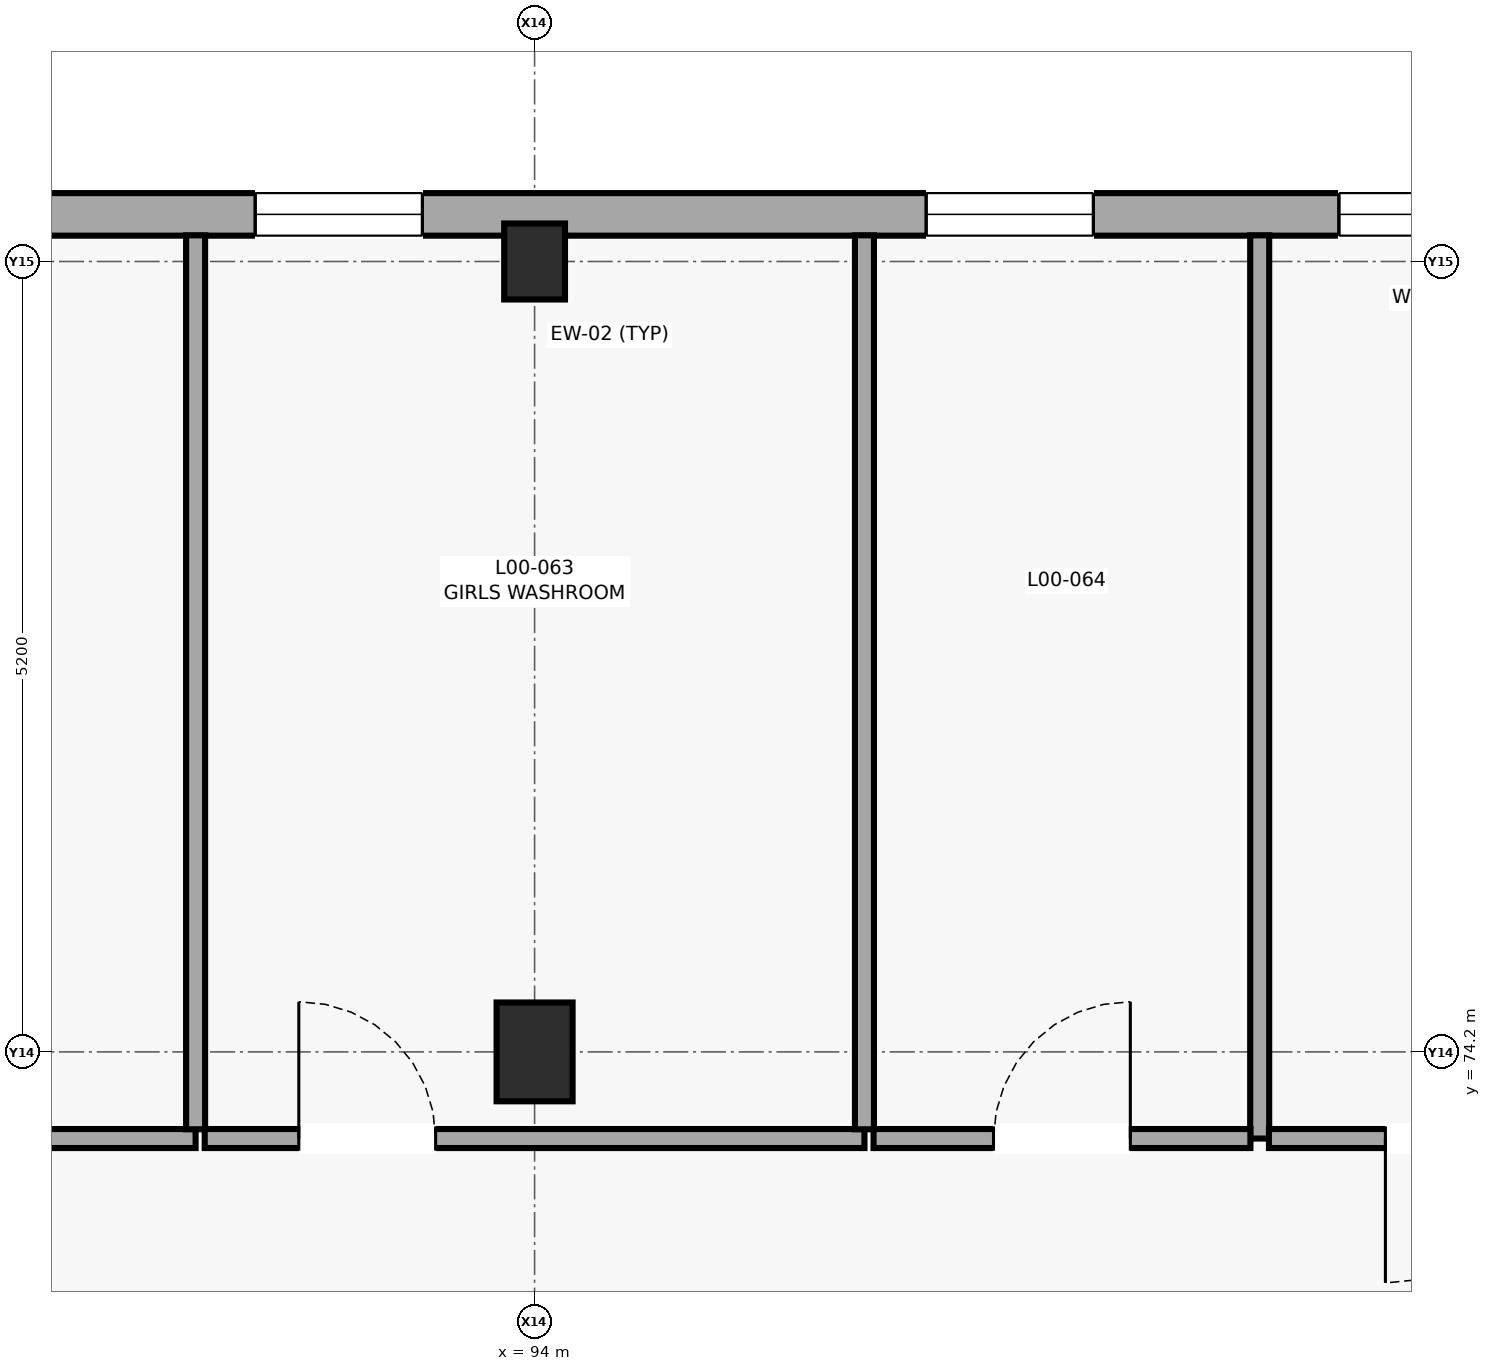
"""IFC4 building model, lengths in metres.
Left out: names, types, materials, properties, quantities, classifications, styles, units other than length and angle.
Written with IfcOpenShell. Run it as: python <this file> out.ifc"""

import sys

from ifc_helpers import new_model, si_unit, direction, frame, frame_2d, origin, origin_2d, place, context, subcontext, project, spatial, rectangle, extrude, element, fill, save


model = new_model("IFC4")
c1 = context("Model", 3, precision=1e-05, world=origin(), true_north=direction((0.0, 1.0)))
c2 = subcontext(c1, "Body", "Model", "MODEL_VIEW")
j1 = project(units=[si_unit("LENGTHUNIT", "METRE"), si_unit("PLANEANGLEUNIT", "RADIAN")], contexts=[c1])
p1 = place(None, origin())
s1 = spatial("IfcSite", under=j1, at=p1, CompositionType="ELEMENT")
p2 = place(p1, origin())
s2 = spatial("IfcBuilding", under=s1, at=p2, CompositionType="ELEMENT")
p3 = place(p2, origin())
s3 = spatial("IfcBuildingStorey", under=s2, at=p3, CompositionType="ELEMENT", Elevation=0.0)
p4 = place(p3, frame((94.0, 74.2, 0.0), z_axis=(0.0, 0.0, 1.0), x_axis=(1.0, 0.0, 0.0)))
e1 = element("IfcColumn", 1, at=p4, inside=s3, PredefinedType="COLUMN", context=c2, shape_type="SweptSolid", body=[
    extrude(rectangle(XDim=0.5, YDim=0.65, at=origin_2d()), origin(), (0.0, 0.0, 1.0), 4.2),
])
p5 = place(p3, frame((94.0, 79.4, 0.0), z_axis=(0.0, 0.0, 1.0), x_axis=(1.0, 0.0, 0.0)))
e2 = element("IfcColumn", 2, at=p5, inside=s3, PredefinedType="PILASTER", context=c2, shape_type="SweptSolid", body=[
    extrude(rectangle(XDim=0.4, YDim=0.5, at=origin_2d()), origin(), (0.0, 0.0, 1.0), 4.2),
])
p6 = place(p3, frame((101.623, 79.71, 0.0), z_axis=(0.0, 0.0, 1.0), x_axis=(-1.0, 0.0, 0.0)))
e3 = element("IfcWall", 3, at=p6, inside=s3, PredefinedType="SOLIDWALL", context=c2, shape_type="SweptSolid", body=[
    extrude(rectangle(XDim=14.258, YDim=0.28, at=frame_2d((7.129, 0.0))), origin(), (0.0, 0.0, 1.0), 3.275),
])
p7 = place(p6, frame((1.232, 0.0, 0.75)))
e4 = element("IfcOpeningElement", 4, at=p7, cuts=e3, PredefinedType="OPENING", context=c2, shape_type="SweptSolid", body=[
    extrude(rectangle(XDim=1.1, YDim=2.1, at=frame_2d((0.55, 1.05))), frame((0.0, 0.15, 0.0), z_axis=(0.0, -1.0, 0.0), x_axis=(1.0, 0.0, 0.0)), (0.0, 0.0, 1.0), 0.3),
])
p8 = place(p6, frame((3.947, 0.0, 0.75)))
e5 = element("IfcOpeningElement", 5, at=p8, cuts=e3, PredefinedType="OPENING", context=c2, shape_type="SweptSolid", body=[
    extrude(rectangle(XDim=1.1, YDim=2.1, at=frame_2d((0.55, 1.05))), frame((0.0, 0.15, 0.0), z_axis=(0.0, -1.0, 0.0), x_axis=(1.0, 0.0, 0.0)), (0.0, 0.0, 1.0), 0.3),
])
p9 = place(p6, frame((8.361, 0.0, 0.75)))
e6 = element("IfcOpeningElement", 6, at=p9, cuts=e3, PredefinedType="OPENING", context=c2, shape_type="SweptSolid", body=[
    extrude(rectangle(XDim=1.1, YDim=2.1, at=frame_2d((0.55, 1.05))), frame((0.0, 0.15, 0.0), z_axis=(0.0, -1.0, 0.0), x_axis=(1.0, 0.0, 0.0)), (0.0, 0.0, 1.0), 0.3),
])
p10 = place(p6, frame((11.601, 0.0, 0.75)))
e7 = element("IfcOpeningElement", 7, at=p10, cuts=e3, PredefinedType="OPENING", context=c2, shape_type="SweptSolid", body=[
    extrude(rectangle(XDim=1.75, YDim=2.05, at=frame_2d((0.875, 1.025))), frame((0.0, 0.15, 0.0), z_axis=(0.0, -1.0, 0.0), x_axis=(1.0, 0.0, 0.0)), (0.0, 0.0, 1.0), 0.3),
])
p11 = place(p3, frame((87.363, 73.63, 0.0), z_axis=(0.0, 0.0, 1.0), x_axis=(1.0, 0.0, 0.0)))
e8 = element("IfcWall", 8, at=p11, inside=s3, PredefinedType="PARTITIONING", context=c2, shape_type="SweptSolid", body=[
    extrude(rectangle(XDim=4.407, YDim=0.125, at=frame_2d((2.204, 0.0))), origin(), (0.0, 0.0, 1.0), 3.975),
])
p12 = place(p11, frame((1.753, 0.0, 0.0)))
e9 = element("IfcOpeningElement", 9, at=p12, cuts=e8, PredefinedType="OPENING", context=c2, shape_type="SweptSolid", body=[
    extrude(rectangle(XDim=0.9, YDim=2.1, at=frame_2d((0.45, 1.05))), frame((0.0, 0.073, 0.0), z_axis=(0.0, -1.0, 0.0), x_axis=(1.0, 0.0, 0.0)), (0.0, 0.0, 1.0), 0.145),
])
p13 = place(p3, frame((91.77, 73.691, 0.0), z_axis=(0.0, 0.0, 1.0), x_axis=(0.0, 1.0, 0.0)))
e10 = element("IfcWall", 10, at=p13, inside=s3, PredefinedType="PARTITIONING", context=c2, shape_type="SweptSolid", body=[
    extrude(rectangle(XDim=5.881, YDim=0.125, at=frame_2d((2.94, 0.0))), origin(), (0.0, 0.0, 1.0), 3.975),
])
p14 = place(p3, frame((91.83, 73.63, 0.0), z_axis=(0.0, 0.0, 1.0), x_axis=(1.0, 0.0, 0.0)))
e11 = element("IfcWall", 11, at=p14, inside=s3, PredefinedType="PARTITIONING", context=c2, shape_type="SweptSolid", body=[
    extrude(rectangle(XDim=4.34, YDim=0.125, at=frame_2d((2.17, 0.0))), origin(), (0.0, 0.0, 1.0), 3.975),
])
p15 = place(p14, frame((0.619, 0.0, 0.0)))
e12 = element("IfcOpeningElement", 12, at=p15, cuts=e11, PredefinedType="OPENING", context=c2, shape_type="SweptSolid", body=[
    extrude(rectangle(XDim=0.9, YDim=2.1, at=frame_2d((0.45, 1.05))), frame((0.0, 0.073, 0.0), z_axis=(0.0, -1.0, 0.0), x_axis=(1.0, 0.0, 0.0)), (0.0, 0.0, 1.0), 0.145),
])
p16 = place(p3, frame((96.17, 73.691, 0.0), z_axis=(0.0, 0.0, 1.0), x_axis=(0.0, 1.0, 0.0)))
e13 = element("IfcWall", 13, at=p16, inside=s3, PredefinedType="PARTITIONING", context=c2, shape_type="SweptSolid", body=[
    extrude(rectangle(XDim=5.881, YDim=0.125, at=frame_2d((2.94, 0.0))), origin(), (0.0, 0.0, 1.0), 3.975),
])
p17 = place(p3, frame((98.77, 73.63, 0.0), z_axis=(0.0, 0.0, 1.0), x_axis=(0.0, 1.0, 0.0)))
e14 = element("IfcWall", 14, at=p17, inside=s3, PredefinedType="PARTITIONING", context=c2, shape_type="SweptSolid", body=[
    extrude(rectangle(XDim=5.942, YDim=0.125, at=frame_2d((2.971, 0.0))), origin(), (0.0, 0.0, 1.0), 3.975),
])
p18 = place(p3, frame((96.23, 73.63, 0.0), z_axis=(0.0, 0.0, 1.0), x_axis=(1.0, 0.0, 0.0)))
e15 = element("IfcWall", 15, at=p18, inside=s3, PredefinedType="PARTITIONING", context=c2, shape_type="SweptSolid", body=[
    extrude(rectangle(XDim=2.479, YDim=0.125, at=frame_2d((1.24, 0.0))), origin(), (0.0, 0.0, 1.0), 3.975),
])
p19 = place(p18, frame((0.789, 0.0, 0.0)))
e16 = element("IfcOpeningElement", 16, at=p19, cuts=e15, PredefinedType="OPENING", context=c2, shape_type="SweptSolid", body=[
    extrude(rectangle(XDim=0.9, YDim=2.1, at=frame_2d((0.45, 1.05))), frame((0.0, 0.073, 0.0), z_axis=(0.0, -1.0, 0.0), x_axis=(1.0, 0.0, 0.0)), (0.0, 0.0, 1.0), 0.145),
])
p20 = place(p3, frame((98.831, 73.63, 0.0), z_axis=(0.0, 0.0, 1.0), x_axis=(1.0, 0.0, 0.0)))
e17 = element("IfcWall", 17, at=p20, inside=s3, PredefinedType="PARTITIONING", context=c2, shape_type="SweptSolid", body=[
    extrude(rectangle(XDim=3.139, YDim=0.125, at=frame_2d((1.569, 0.0))), origin(), (0.0, 0.0, 1.0), 3.975),
])
p21 = place(p20, frame((0.766, 0.0, 0.0)))
e18 = element("IfcOpeningElement", 18, at=p21, cuts=e17, PredefinedType="OPENING", context=c2, shape_type="SweptSolid", body=[
    extrude(rectangle(XDim=0.95, YDim=2.15, at=frame_2d((0.475, 1.075))), frame((0.0, 0.073, 0.0), z_axis=(0.0, -1.0, 0.0), x_axis=(1.0, 0.0, 0.0)), (0.0, 0.0, 1.0), 0.145),
])
p22 = place(p7, origin())
e19 = element("IfcWindow", 19, at=p22, inside=s3, PartitioningType="SINGLE_PANEL", PredefinedType="WINDOW", context=c2, shape_type="SweptSolid", body=[
    extrude(rectangle(XDim=1.1, YDim=2.1, at=frame_2d((0.55, 1.05))), frame((0.0, 0.03, 0.0), z_axis=(0.0, -1.0, 0.0), x_axis=(1.0, 0.0, 0.0)), (0.0, 0.0, 1.0), 0.06),
])
fill(e4, e19)
p23 = place(p8, origin())
e20 = element("IfcWindow", 20, at=p23, inside=s3, PartitioningType="SINGLE_PANEL", PredefinedType="WINDOW", context=c2, shape_type="SweptSolid", body=[
    extrude(rectangle(XDim=1.1, YDim=2.1, at=frame_2d((0.55, 1.05))), frame((0.0, 0.03, 0.0), z_axis=(0.0, -1.0, 0.0), x_axis=(1.0, 0.0, 0.0)), (0.0, 0.0, 1.0), 0.06),
])
fill(e5, e20)
p24 = place(p9, origin())
e21 = element("IfcWindow", 21, at=p24, inside=s3, PartitioningType="SINGLE_PANEL", PredefinedType="WINDOW", context=c2, shape_type="SweptSolid", body=[
    extrude(rectangle(XDim=1.1, YDim=2.1, at=frame_2d((0.55, 1.05))), frame((0.0, 0.03, 0.0), z_axis=(0.0, -1.0, 0.0), x_axis=(1.0, 0.0, 0.0)), (0.0, 0.0, 1.0), 0.06),
])
fill(e6, e21)
p25 = place(p15, origin())
e22 = element("IfcDoor", 22, at=p25, inside=s3, OperationType="SINGLE_SWING_LEFT", PredefinedType="DOOR", context=c2, shape_type="SweptSolid", body=[
    extrude(rectangle(XDim=0.9, YDim=2.1, at=frame_2d((0.45, 1.05))), frame((0.0, 0.025, 0.0), z_axis=(0.0, -1.0, 0.0), x_axis=(1.0, 0.0, 0.0)), (0.0, 0.0, 1.0), 0.05),
])
fill(e12, e22)
p26 = place(p19, origin())
e23 = element("IfcDoor", 23, at=p26, inside=s3, OperationType="SINGLE_SWING_RIGHT", PredefinedType="DOOR", context=c2, shape_type="SweptSolid", body=[
    extrude(rectangle(XDim=0.9, YDim=2.1, at=frame_2d((0.45, 1.05))), frame((0.0, 0.025, 0.0), z_axis=(0.0, -1.0, 0.0), x_axis=(1.0, 0.0, 0.0)), (0.0, 0.0, 1.0), 0.05),
])
fill(e16, e23)
p27 = place(p21, frame((0.95, 0.0, 0.0), z_axis=(0.0, 0.0, 1.0), x_axis=(-1.0, 0.0, 0.0)))
e24 = element("IfcDoor", 24, at=p27, inside=s3, OperationType="SINGLE_SWING_LEFT", PredefinedType="DOOR", context=c2, shape_type="SweptSolid", body=[
    extrude(rectangle(XDim=0.95, YDim=2.15, at=frame_2d((0.475, 1.075))), frame((0.0, 0.025, 0.0), z_axis=(0.0, -1.0, 0.0), x_axis=(1.0, 0.0, 0.0)), (0.0, 0.0, 1.0), 0.05),
])
fill(e18, e24)
save(model, sys.argv[1])
